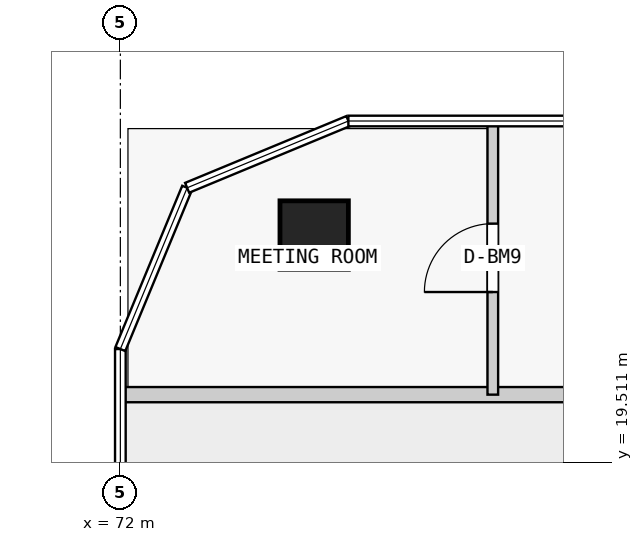
"""IFC4 building model, lengths in metres.
Left out: names, types, materials, properties, quantities, classifications, styles, units other than length and angle.
Written with IfcOpenShell. Run it as: python <this file> out.ifc"""

import sys

from ifc_helpers import new_model, si_unit, direction, frame, frame_2d, origin, origin_2d, place, context, subcontext, project, spatial, rectangle, extrude, element, fill, save


model = new_model("IFC4")
c1 = context("Model", 3, precision=1e-05, world=origin(), true_north=direction((0.0, 1.0)))
c2 = subcontext(c1, "Body", "Model", "MODEL_VIEW")
j1 = project(units=[si_unit("LENGTHUNIT", "METRE"), si_unit("PLANEANGLEUNIT", "RADIAN")], contexts=[c1])
p1 = place(None, origin())
s1 = spatial("IfcSite", under=j1, at=p1, CompositionType="ELEMENT")
p2 = place(p1, origin())
s2 = spatial("IfcBuilding", under=s1, at=p2, CompositionType="ELEMENT")
p3 = place(p2, frame((0.0, 0.0, 40.8)))
s3 = spatial("IfcBuildingStorey", under=s2, at=p3, CompositionType="ELEMENT", Elevation=40.8)
p4 = place(p3, frame((74.55, 22.5, 0.0), z_axis=(0.0, 0.0, 1.0), x_axis=(1.0, 0.0, 0.0)))
e1 = element("IfcColumn", 1, at=p4, inside=s3, PredefinedType="COLUMN", context=c2, shape_type="SweptSolid", body=[
    extrude(rectangle(XDim=0.9, YDim=0.9, at=origin_2d()), origin(), (0.0, 0.0, 1.0), 3.5),
])
p5 = place(p3, frame((72.0, 20.4, 0.0), z_axis=(0.0, 0.0, 1.0), x_axis=(1.0, 0.0, 0.0)))
e2 = element("IfcWall", 2, at=p5, inside=s3, PredefinedType="PARTITIONING", context=c2, shape_type="SweptSolid", body=[
    extrude(rectangle(XDim=20.0, YDim=0.2, at=frame_2d((10.0, 0.0))), origin(), (0.0, 0.0, 1.0), 3.25),
])
p6 = place(p3, frame((76.9, 20.4, 0.0), z_axis=(0.0, 0.0, 1.0), x_axis=(0.0, 1.0, 0.0)))
e3 = element("IfcWall", 3, at=p6, inside=s3, PredefinedType="PARTITIONING", context=c2, shape_type="SweptSolid", body=[
    extrude(rectangle(XDim=3.6, YDim=0.14, at=frame_2d((1.8, 0.0))), origin(), (0.0, 0.0, 1.0), 3.25),
])
p7 = place(p6, frame((1.35, 0.0, 0.0)))
e4 = element("IfcOpeningElement", 4, at=p7, cuts=e3, PredefinedType="OPENING", context=c2, shape_type="SweptSolid", body=[
    extrude(rectangle(XDim=0.9, YDim=2.4, at=frame_2d((0.45, 1.2))), frame((0.0, 0.08, 0.0), z_axis=(0.0, -1.0, 0.0), x_axis=(1.0, 0.0, 0.0)), (0.0, 0.0, 1.0), 0.16),
])
p8 = place(p7, origin())
e5 = element("IfcDoor", 5, at=p8, inside=s3, OperationType="SINGLE_SWING_LEFT", PredefinedType="DOOR", context=c2, shape_type="SweptSolid", body=[
    extrude(rectangle(XDim=0.9, YDim=2.4, at=frame_2d((0.45, 1.2))), frame((0.0, 0.025, 0.0), z_axis=(0.0, -1.0, 0.0), x_axis=(1.0, 0.0, 0.0)), (0.0, 0.0, 1.0), 0.05),
])
fill(e4, e5)
save(model, sys.argv[1])
